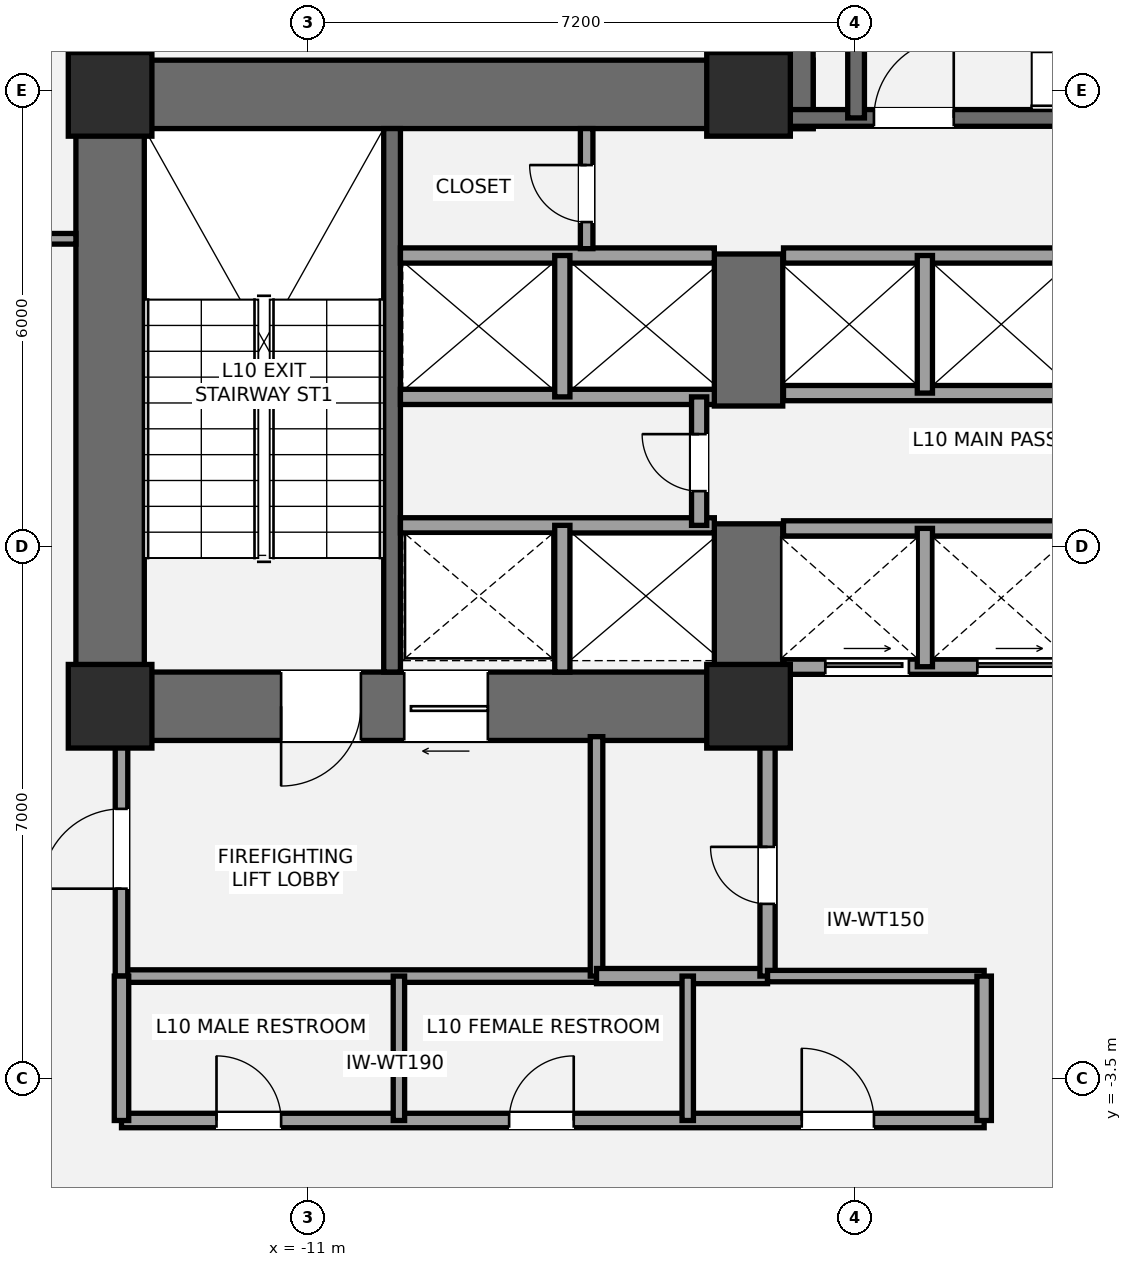
"""IFC4 building model, lengths in metres.
Left out: names, types, materials, properties, quantities, classifications, styles, units other than length and angle.
Written with IfcOpenShell. Run it as: python <this file> out.ifc"""

import sys

from ifc_helpers import new_model, si_unit, direction, frame, frame_2d, origin, origin_2d, place, context, subcontext, project, spatial, rectangle, extrude, element, fill, save


model = new_model("IFC4")
c1 = context("Model", 3, precision=1e-05, world=origin(), true_north=direction((0.0, 1.0)))
c2 = subcontext(c1, "Body", "Model", "MODEL_VIEW")
j1 = project(units=[si_unit("LENGTHUNIT", "METRE"), si_unit("PLANEANGLEUNIT", "RADIAN")], contexts=[c1])
p1 = place(None, origin())
s1 = spatial("IfcSite", under=j1, at=p1, CompositionType="ELEMENT")
p2 = place(p1, origin())
s2 = spatial("IfcBuilding", under=s1, at=p2, CompositionType="ELEMENT")
p3 = place(p2, frame((0.0, 0.0, 41.4)))
s3 = spatial("IfcBuildingStorey", under=s2, at=p3, CompositionType="ELEMENT", Elevation=41.4)
p4 = place(p3, frame((-13.6, 0.95, 0.0), z_axis=(0.0, 0.0, 1.0), x_axis=(0.0, 1.0, 0.0)))
e1 = element("IfcWall", 1, at=p4, inside=s3, PredefinedType="SHEAR", context=c2, shape_type="SweptSolid", body=[
    extrude(rectangle(XDim=8.95, YDim=0.9, at=frame_2d((4.475, 0.0))), origin(), (0.0, 0.0, 1.0), 3.6),
])
p5 = place(p3, frame((-14.05, 9.45, 0.0), z_axis=(0.0, 0.0, 1.0), x_axis=(1.0, 0.0, 0.0)))
e2 = element("IfcWall", 2, at=p5, inside=s3, PredefinedType="SHEAR", context=c2, shape_type="SweptSolid", body=[
    extrude(rectangle(XDim=9.7, YDim=0.9, at=frame_2d((4.85, 0.0))), origin(), (0.0, 0.0, 1.0), 3.6),
])
p6 = place(p3, frame((-4.75, 1.4, 0.0), z_axis=(0.0, 0.0, 1.0), x_axis=(-1.0, 0.0, 0.0)))
e3 = element("IfcWall", 3, at=p6, inside=s3, PredefinedType="SHEAR", context=c2, shape_type="SweptSolid", body=[
    extrude(rectangle(XDim=9.3, YDim=0.9, at=frame_2d((4.65, 0.0))), origin(), (0.0, 0.0, 1.0), 3.6),
])
p7 = place(p6, frame((5.55, 0.0, 0.0)))
e4 = element("IfcOpeningElement", 4, at=p7, cuts=e3, PredefinedType="OPENING", context=c2, shape_type="SweptSolid", body=[
    extrude(rectangle(XDim=1.05, YDim=2.15, at=frame_2d((0.525, 1.075))), frame((0.0, 0.46, 0.0), z_axis=(0.0, -1.0, 0.0), x_axis=(1.0, 0.0, 0.0)), (0.0, 0.0, 1.0), 0.92),
])
p8 = place(p6, frame((3.88, 0.0, 0.0)))
e5 = element("IfcOpeningElement", 5, at=p8, cuts=e3, PredefinedType="OPENING", context=c2, shape_type="SweptSolid", body=[
    extrude(rectangle(XDim=1.1, YDim=2.2, at=frame_2d((0.55, 1.1))), frame((0.0, 0.46, 0.0), z_axis=(0.0, -1.0, 0.0), x_axis=(1.0, 0.0, 0.0)), (0.0, 0.0, 1.0), 0.92),
])
p9 = place(p3, frame((-5.2, 0.95, 0.0), z_axis=(0.0, 0.0, 1.0), x_axis=(0.0, 1.0, 0.0)))
e6 = element("IfcWall", 6, at=p9, inside=s3, PredefinedType="SHEAR", context=c2, shape_type="SweptSolid", body=[
    extrude(rectangle(XDim=2.85, YDim=0.9, at=frame_2d((1.425, 0.0))), origin(), (0.0, 0.0, 1.0), 3.6),
])
p10 = place(p3, frame((-5.2, 5.35, 0.0), z_axis=(0.0, 0.0, 1.0), x_axis=(0.0, 1.0, 0.0)))
e7 = element("IfcWall", 7, at=p10, inside=s3, PredefinedType="SHEAR", context=c2, shape_type="SweptSolid", body=[
    extrude(rectangle(XDim=2.0, YDim=0.9, at=frame_2d((1.0, 0.0))), origin(), (0.0, 0.0, 1.0), 3.6),
])
p11 = place(p3, frame((-9.89, 1.85, 0.0), z_axis=(0.0, 0.0, 1.0), x_axis=(0.0, 1.0, 0.0)))
e8 = element("IfcWall", 8, at=p11, inside=s3, PredefinedType="SHEAR", context=c2, shape_type="SweptSolid", body=[
    extrude(rectangle(XDim=7.15, YDim=0.22, at=frame_2d((3.575, 0.0))), origin(), (0.0, 0.0, 1.0), 3.6),
])
p12 = place(p3, frame((-4.8, 9.0, 0.0), z_axis=(0.0, 0.0, 1.0), x_axis=(0.0, 1.0, 0.0)))
e9 = element("IfcWall", 9, at=p12, inside=s3, PredefinedType="SHEAR", context=c2, shape_type="SweptSolid", body=[
    extrude(rectangle(XDim=4.3, YDim=0.9, at=frame_2d((2.15, 0.0))), origin(), (0.0, 0.0, 1.0), 3.6),
])
p13 = place(p3, frame((-4.7, 9.14, 0.0), z_axis=(0.0, 0.0, 1.0), x_axis=(1.0, 0.0, 0.0)))
e10 = element("IfcWall", 10, at=p13, inside=s3, PredefinedType="SHEAR", context=c2, shape_type="SweptSolid", body=[
    extrude(rectangle(XDim=9.3, YDim=0.22, at=frame_2d((4.65, 0.0))), origin(), (0.0, 0.0, 1.0), 3.6),
])
p14 = place(p13, frame((1.15, 0.0, 0.0)))
e11 = element("IfcOpeningElement", 11, at=p14, cuts=e10, PredefinedType="OPENING", context=c2, shape_type="SweptSolid", body=[
    extrude(rectangle(XDim=1.05, YDim=2.15, at=frame_2d((0.525, 1.075))), frame((0.0, 0.12, 0.0), z_axis=(0.0, -1.0, 0.0), x_axis=(1.0, 0.0, 0.0)), (0.0, 0.0, 1.0), 0.24),
])
p15 = place(p3, frame((-3.785, 9.14, 0.0), z_axis=(0.0, 0.0, 1.0), x_axis=(0.0, 1.0, 0.0)))
e12 = element("IfcWall", 12, at=p15, inside=s3, PredefinedType="SHEAR", context=c2, shape_type="SweptSolid", body=[
    extrude(rectangle(XDim=3.26, YDim=0.22, at=frame_2d((1.63, 0.0))), origin(), (0.0, 0.0, 1.0), 3.6),
])
for number, where, z_axis, x_axis in (
    (13, (-13.6, 1.4, 0.0), (0.0, 0.0, 1.0), (1.0, 0.0, 0.0)),
    (14, (-13.6, 9.45, 0.0), (0.0, 0.0, 1.0), (1.0, 0.0, 0.0)),
    (15, (-5.2, 1.4, 0.0), (0.0, 0.0, 1.0), (1.0, 0.0, 0.0)),
    (16, (-5.2, 9.45, 0.0), (0.0, 0.0, 1.0), (1.0, 0.0, 0.0)),
):
    element("IfcColumn", number, at=place(p3, frame(where, z_axis=z_axis, x_axis=x_axis)), inside=s3, PredefinedType="COLUMN", context=c2, shape_type="SweptSolid", body=[
        extrude(rectangle(XDim=1.1, YDim=1.1, at=origin_2d()), origin(), (0.0, 0.0, 1.0), 3.6),
    ])
p16 = place(p3, frame((-13.45, -2.15, 0.0), z_axis=(0.0, 0.0, 1.0), x_axis=(1.0, 0.0, 0.0)))
e17 = element("IfcWall", 17, at=p16, inside=s3, PredefinedType="PARTITIONING", context=c2, shape_type="SweptSolid", body=[
    extrude(rectangle(XDim=6.25, YDim=0.165, at=frame_2d((3.125, 0.0))), origin(), (0.0, 0.0, 1.0), 2.853),
])
p17 = place(p3, frame((-13.45, -2.15, 0.0), z_axis=(0.0, 0.0, 1.0), x_axis=(0.0, 1.0, 0.0)))
e18 = element("IfcWall", 18, at=p17, inside=s3, PredefinedType="PARTITIONING", context=c2, shape_type="SweptSolid", body=[
    extrude(rectangle(XDim=3.15, YDim=0.165, at=frame_2d((1.575, 0.0))), origin(), (0.0, 0.0, 1.0), 2.853),
])
p18 = place(p17, frame((1.15, 0.0, 0.0)))
e19 = element("IfcOpeningElement", 19, at=p18, cuts=e18, PredefinedType="OPENING", context=c2, shape_type="SweptSolid", body=[
    extrude(rectangle(XDim=1.05, YDim=2.15, at=frame_2d((0.525, 1.075))), frame((0.0, 0.093, 0.0), z_axis=(0.0, -1.0, 0.0), x_axis=(1.0, 0.0, 0.0)), (0.0, 0.0, 1.0), 0.185),
])
p19 = place(p3, frame((-7.2, -2.15, 0.0), z_axis=(0.0, 0.0, 1.0), x_axis=(0.0, 1.0, 0.0)))
e20 = element("IfcWall", 20, at=p19, inside=s3, PredefinedType="PARTITIONING", context=c2, shape_type="SweptSolid", body=[
    extrude(rectangle(XDim=3.15, YDim=0.165, at=frame_2d((1.575, 0.0))), origin(), (0.0, 0.0, 1.0), 2.853),
])
p20 = place(p3, frame((-7.2, -2.15, 0.0), z_axis=(0.0, 0.0, 1.0), x_axis=(1.0, 0.0, 0.0)))
e21 = element("IfcWall", 21, at=p20, inside=s3, PredefinedType="SOLIDWALL", context=c2, shape_type="SweptSolid", body=[
    extrude(rectangle(XDim=2.25, YDim=0.2, at=frame_2d((1.125, 0.0))), origin(), (0.0, 0.0, 1.0), 3.4),
])
p21 = place(p3, frame((-4.95, -2.15, 0.0), z_axis=(0.0, 0.0, 1.0), x_axis=(0.0, 1.0, 0.0)))
e22 = element("IfcWall", 22, at=p21, inside=s3, PredefinedType="SOLIDWALL", context=c2, shape_type="SweptSolid", body=[
    extrude(rectangle(XDim=3.15, YDim=0.2, at=frame_2d((1.575, 0.0))), origin(), (0.0, 0.0, 1.0), 2.853),
])
p22 = place(p21, frame((0.95, 0.0, 0.0)))
e23 = element("IfcOpeningElement", 23, at=p22, cuts=e22, PredefinedType="OPENING", context=c2, shape_type="SweptSolid", body=[
    extrude(rectangle(XDim=0.75, YDim=2.1, at=frame_2d((0.375, 1.05))), frame((0.0, 0.11, 0.0), z_axis=(0.0, -1.0, 0.0), x_axis=(1.0, 0.0, 0.0)), (0.0, 0.0, 1.0), 0.22),
])
p23 = place(p3, frame((-9.78, 3.78, 0.0), z_axis=(0.0, 0.0, 1.0), x_axis=(1.0, 0.0, 0.0)))
e24 = element("IfcWall", 24, at=p23, inside=s3, PredefinedType="SOLIDWALL", context=c2, shape_type="SweptSolid", body=[
    extrude(rectangle(XDim=4.13, YDim=0.2, at=frame_2d((2.065, 0.0))), origin(), (0.0, 0.0, 1.0), 3.4),
])
p24 = place(p3, frame((-7.65, 1.85, 0.0), z_axis=(0.0, 0.0, 1.0), x_axis=(0.0, 1.0, 0.0)))
e25 = element("IfcWall", 25, at=p24, inside=s3, PredefinedType="SOLIDWALL", context=c2, shape_type="SweptSolid", body=[
    extrude(rectangle(XDim=1.93, YDim=0.2, at=frame_2d((0.965, 0.0))), origin(), (0.0, 0.0, 1.0), 3.4),
])
for number, where, z_axis, x_axis in (
    (26, (-9.78, 5.47, 0.0), (0.0, 0.0, 1.0), (1.0, 0.0, 0.0)),
    (27, (-9.78, 7.33, 0.0), (0.0, 0.0, 1.0), (1.0, 0.0, 0.0)),
):
    element("IfcWall", number, at=place(p3, frame(where, z_axis=z_axis, x_axis=x_axis)), inside=s3, PredefinedType="SOLIDWALL", context=c2, shape_type="SweptSolid", body=[
        extrude(rectangle(XDim=4.13, YDim=0.2, at=frame_2d((2.065, 0.0))), origin(), (0.0, 0.0, 1.0), 3.4),
    ])
p25 = place(p3, frame((-7.65, 5.47, 0.0), z_axis=(0.0, 0.0, 1.0), x_axis=(0.0, 1.0, 0.0)))
e28 = element("IfcWall", 28, at=p25, inside=s3, PredefinedType="SOLIDWALL", context=c2, shape_type="SweptSolid", body=[
    extrude(rectangle(XDim=1.86, YDim=0.2, at=frame_2d((0.93, 0.0))), origin(), (0.0, 0.0, 1.0), 3.4),
])
p26 = place(p3, frame((-5.85, 3.78, 0.0), z_axis=(0.0, 0.0, 1.0), x_axis=(0.0, 1.0, 0.0)))
e29 = element("IfcWall", 29, at=p26, inside=s3, PredefinedType="SOLIDWALL", context=c2, shape_type="SweptSolid", body=[
    extrude(rectangle(XDim=1.69, YDim=0.2, at=frame_2d((0.845, 0.0))), origin(), (0.0, 0.0, 1.0), 3.4),
])
p27 = place(p26, frame((0.45, 0.0, 0.0)))
e30 = element("IfcOpeningElement", 30, at=p27, cuts=e29, PredefinedType="OPENING", context=c2, shape_type="SweptSolid", body=[
    extrude(rectangle(XDim=0.75, YDim=2.1, at=frame_2d((0.375, 1.05))), frame((0.0, 0.11, 0.0), z_axis=(0.0, -1.0, 0.0), x_axis=(1.0, 0.0, 0.0)), (0.0, 0.0, 1.0), 0.22),
])
p28 = place(p3, frame((-4.74, 1.92, 0.0), z_axis=(0.0, 0.0, 1.0), x_axis=(1.0, 0.0, 0.0)))
e31 = element("IfcWall", 31, at=p28, inside=s3, PredefinedType="SOLIDWALL", context=c2, shape_type="SweptSolid", body=[
    extrude(rectangle(XDim=3.86, YDim=0.2, at=frame_2d((1.93, 0.0))), origin(), (0.0, 0.0, 1.0), 2.39),
])
p29 = place(p28, frame((0.55, 0.0, 0.0)))
e32 = element("IfcOpeningElement", 32, at=p29, cuts=e31, PredefinedType="OPENING", context=c2, shape_type="SweptSolid", body=[
    extrude(rectangle(XDim=1.1, YDim=2.2, at=frame_2d((0.55, 1.1))), frame((0.0, 0.11, 0.0), z_axis=(0.0, -1.0, 0.0), x_axis=(1.0, 0.0, 0.0)), (0.0, 0.0, 1.0), 0.22),
])
p30 = place(p28, frame((2.55, 0.0, 0.0)))
e33 = element("IfcOpeningElement", 33, at=p30, cuts=e31, PredefinedType="OPENING", context=c2, shape_type="SweptSolid", body=[
    extrude(rectangle(XDim=1.1, YDim=2.2, at=frame_2d((0.55, 1.1))), frame((0.0, 0.11, 0.0), z_axis=(0.0, -1.0, 0.0), x_axis=(1.0, 0.0, 0.0)), (0.0, 0.0, 1.0), 0.22),
])
p31 = place(p3, frame((-4.74, 3.74, 0.0), z_axis=(0.0, 0.0, 1.0), x_axis=(1.0, 0.0, 0.0)))
e34 = element("IfcWall", 34, at=p31, inside=s3, PredefinedType="SOLIDWALL", context=c2, shape_type="SweptSolid", body=[
    extrude(rectangle(XDim=3.86, YDim=0.2, at=frame_2d((1.93, 0.0))), origin(), (0.0, 0.0, 1.0), 3.4),
])
p32 = place(p3, frame((-2.88, 1.92, 0.0), z_axis=(0.0, 0.0, 1.0), x_axis=(0.0, 1.0, 0.0)))
e35 = element("IfcWall", 35, at=p32, inside=s3, PredefinedType="SOLIDWALL", context=c2, shape_type="SweptSolid", body=[
    extrude(rectangle(XDim=1.82, YDim=0.2, at=frame_2d((0.91, 0.0))), origin(), (0.0, 0.0, 1.0), 3.4),
])
for number, where, z_axis, x_axis in (
    (36, (-4.74, 5.52, 0.0), (0.0, 0.0, 1.0), (1.0, 0.0, 0.0)),
    (37, (-4.74, 7.33, 0.0), (0.0, 0.0, 1.0), (1.0, 0.0, 0.0)),
):
    element("IfcWall", number, at=place(p3, frame(where, z_axis=z_axis, x_axis=x_axis)), inside=s3, PredefinedType="SOLIDWALL", context=c2, shape_type="SweptSolid", body=[
        extrude(rectangle(XDim=3.86, YDim=0.2, at=frame_2d((1.93, 0.0))), origin(), (0.0, 0.0, 1.0), 3.4),
    ])
p33 = place(p3, frame((-2.88, 5.52, 0.0), z_axis=(0.0, 0.0, 1.0), x_axis=(0.0, 1.0, 0.0)))
e38 = element("IfcWall", 38, at=p33, inside=s3, PredefinedType="SOLIDWALL", context=c2, shape_type="SweptSolid", body=[
    extrude(rectangle(XDim=1.81, YDim=0.2, at=frame_2d((0.905, 0.0))), origin(), (0.0, 0.0, 1.0), 3.4),
])
p34 = place(p3, frame((-7.33, 7.42, 0.0), z_axis=(0.0, 0.0, 1.0), x_axis=(0.0, 1.0, 0.0)))
e39 = element("IfcWall", 39, at=p34, inside=s3, PredefinedType="PARTITIONING", context=c2, shape_type="SweptSolid", body=[
    extrude(rectangle(XDim=1.58, YDim=0.165, at=frame_2d((0.79, 0.0))), origin(), (0.0, 0.0, 1.0), 3.4),
])
p35 = place(p34, frame((0.35, 0.0, 0.0)))
e40 = element("IfcOpeningElement", 40, at=p35, cuts=e39, PredefinedType="OPENING", context=c2, shape_type="SweptSolid", body=[
    extrude(rectangle(XDim=0.75, YDim=2.1, at=frame_2d((0.375, 1.05))), frame((0.0, 0.093, 0.0), z_axis=(0.0, -1.0, 0.0), x_axis=(1.0, 0.0, 0.0)), (0.0, 0.0, 1.0), 0.185),
])
p36 = place(p3, frame((-13.45, -4.05, 0.0), z_axis=(0.0, 0.0, 1.0), x_axis=(1.0, 0.0, 0.0)))
e41 = element("IfcWall", 41, at=p36, inside=s3, PredefinedType="PLUMBINGWALL", context=c2, shape_type="SweptSolid", body=[
    extrude(rectangle(XDim=11.35, YDim=0.19, at=frame_2d((5.675, 0.0))), origin(), (0.0, 0.0, 1.0), 2.853),
])
p37 = place(p36, frame((1.25, 0.0, 0.0)))
e42 = element("IfcOpeningElement", 42, at=p37, cuts=e41, PredefinedType="OPENING", context=c2, shape_type="SweptSolid", body=[
    extrude(rectangle(XDim=0.85, YDim=2.1, at=frame_2d((0.425, 1.05))), frame((0.0, 0.105, 0.0), z_axis=(0.0, -1.0, 0.0), x_axis=(1.0, 0.0, 0.0)), (0.0, 0.0, 1.0), 0.21),
])
p38 = place(p36, frame((5.1, 0.0, 0.0)))
e43 = element("IfcOpeningElement", 43, at=p38, cuts=e41, PredefinedType="OPENING", context=c2, shape_type="SweptSolid", body=[
    extrude(rectangle(XDim=0.85, YDim=2.1, at=frame_2d((0.425, 1.05))), frame((0.0, 0.105, 0.0), z_axis=(0.0, -1.0, 0.0), x_axis=(1.0, 0.0, 0.0)), (0.0, 0.0, 1.0), 0.21),
])
p39 = place(p36, frame((8.95, 0.0, 0.0)))
e44 = element("IfcOpeningElement", 44, at=p39, cuts=e41, PredefinedType="OPENING", context=c2, shape_type="SweptSolid", body=[
    extrude(rectangle(XDim=0.95, YDim=2.15, at=frame_2d((0.475, 1.075))), frame((0.0, 0.105, 0.0), z_axis=(0.0, -1.0, 0.0), x_axis=(1.0, 0.0, 0.0)), (0.0, 0.0, 1.0), 0.21),
])
p40 = place(p3, frame((-4.95, -2.15, 0.0), z_axis=(0.0, 0.0, 1.0), x_axis=(1.0, 0.0, 0.0)))
e45 = element("IfcWall", 45, at=p40, inside=s3, PredefinedType="PLUMBINGWALL", context=c2, shape_type="SweptSolid", body=[
    extrude(rectangle(XDim=2.85, YDim=0.15, at=frame_2d((1.425, 0.0))), origin(), (0.0, 0.0, 1.0), 2.853),
])
p41 = place(p3, frame((-13.45, -4.05, 0.0), z_axis=(0.0, 0.0, 1.0), x_axis=(0.0, 1.0, 0.0)))
e46 = element("IfcWall", 46, at=p41, inside=s3, PredefinedType="PLUMBINGWALL", context=c2, shape_type="SweptSolid", body=[
    extrude(rectangle(XDim=1.9, YDim=0.19, at=frame_2d((0.95, 0.0))), origin(), (0.0, 0.0, 1.0), 2.853),
])
p42 = place(p3, frame((-2.1, -4.05, 0.0), z_axis=(0.0, 0.0, 1.0), x_axis=(0.0, 1.0, 0.0)))
e47 = element("IfcWall", 47, at=p42, inside=s3, PredefinedType="PLUMBINGWALL", context=c2, shape_type="SweptSolid", body=[
    extrude(rectangle(XDim=1.9, YDim=0.19, at=frame_2d((0.95, 0.0))), origin(), (0.0, 0.0, 1.0), 3.4),
])
p43 = place(p3, frame((-9.8, -4.05, 0.0), z_axis=(0.0, 0.0, 1.0), x_axis=(0.0, 1.0, 0.0)))
e48 = element("IfcWall", 48, at=p43, inside=s3, PredefinedType="PLUMBINGWALL", context=c2, shape_type="SweptSolid", body=[
    extrude(rectangle(XDim=1.9, YDim=0.15, at=frame_2d((0.95, 0.0))), origin(), (0.0, 0.0, 1.0), 2.853),
])
p44 = place(p3, frame((-6.0, -4.05, 0.0), z_axis=(0.0, 0.0, 1.0), x_axis=(0.0, 1.0, 0.0)))
e49 = element("IfcWall", 49, at=p44, inside=s3, PredefinedType="PLUMBINGWALL", context=c2, shape_type="SweptSolid", body=[
    extrude(rectangle(XDim=1.9, YDim=0.15, at=frame_2d((0.95, 0.0))), origin(), (0.0, 0.0, 1.0), 2.841),
])
p45 = place(p3, frame((-24.856, 7.55, 0.0), z_axis=(0.0, 0.0, 1.0), x_axis=(1.0, 0.0, 0.0)))
e50 = element("IfcWall", 50, at=p45, inside=s3, PredefinedType="PARTITIONING", context=c2, shape_type="SweptSolid", body=[
    extrude(rectangle(XDim=10.806, YDim=0.14, at=frame_2d((5.403, 0.0))), origin(), (0.0, 0.0, 1.0), 2.853),
])
p46 = place(p45, frame((1.939, 0.0, 0.0)))
e51 = element("IfcOpeningElement", 51, at=p46, cuts=e50, PredefinedType="OPENING", context=c2, shape_type="SweptSolid", body=[
    extrude(rectangle(XDim=0.92, YDim=2.15, at=frame_2d((0.46, 1.075))), frame((0.0, 0.08, 0.0), z_axis=(0.0, -1.0, 0.0), x_axis=(1.0, 0.0, 0.0)), (0.0, 0.0, 1.0), 0.16),
])
p47 = place(p7, origin())
e52 = element("IfcDoor", 52, at=p47, inside=s3, OperationType="SINGLE_SWING_RIGHT", PredefinedType="DOOR", context=c2, shape_type="SweptSolid", body=[
    extrude(rectangle(XDim=1.05, YDim=2.15, at=frame_2d((0.525, 1.075))), frame((0.0, 0.025, 0.0), z_axis=(0.0, -1.0, 0.0), x_axis=(1.0, 0.0, 0.0)), (0.0, 0.0, 1.0), 0.05),
])
fill(e4, e52)
p48 = place(p14, origin())
e53 = element("IfcDoor", 53, at=p48, inside=s3, OperationType="SINGLE_SWING_RIGHT", PredefinedType="DOOR", context=c2, shape_type="SweptSolid", body=[
    extrude(rectangle(XDim=1.05, YDim=2.15, at=frame_2d((0.525, 1.075))), frame((0.0, 0.025, 0.0), z_axis=(0.0, -1.0, 0.0), x_axis=(1.0, 0.0, 0.0)), (0.0, 0.0, 1.0), 0.05),
])
fill(e11, e53)
p49 = place(p18, origin())
e54 = element("IfcDoor", 54, at=p49, inside=s3, OperationType="SINGLE_SWING_LEFT", PredefinedType="DOOR", context=c2, shape_type="SweptSolid", body=[
    extrude(rectangle(XDim=1.05, YDim=2.15, at=frame_2d((0.525, 1.075))), frame((0.0, 0.025, 0.0), z_axis=(0.0, -1.0, 0.0), x_axis=(1.0, 0.0, 0.0)), (0.0, 0.0, 1.0), 0.05),
])
fill(e19, e54)
p50 = place(p22, origin())
e55 = element("IfcDoor", 55, at=p50, inside=s3, OperationType="SINGLE_SWING_RIGHT", PredefinedType="DOOR", context=c2, shape_type="SweptSolid", body=[
    extrude(rectangle(XDim=0.75, YDim=2.1, at=frame_2d((0.375, 1.05))), frame((0.0, 0.025, 0.0), z_axis=(0.0, -1.0, 0.0), x_axis=(1.0, 0.0, 0.0)), (0.0, 0.0, 1.0), 0.05),
])
fill(e23, e55)
p51 = place(p8, origin())
e56 = element("IfcDoor", 56, at=p51, inside=s3, OperationType="SLIDING_TO_LEFT", PredefinedType="DOOR", context=c2, shape_type="SweptSolid", body=[
    extrude(rectangle(XDim=1.1, YDim=2.2, at=frame_2d((0.55, 1.1))), frame((0.0, 0.025, 0.0), z_axis=(0.0, -1.0, 0.0), x_axis=(1.0, 0.0, 0.0)), (0.0, 0.0, 1.0), 0.05),
])
fill(e5, e56)
p52 = place(p27, origin())
e57 = element("IfcDoor", 57, at=p52, inside=s3, OperationType="SINGLE_SWING_RIGHT", PredefinedType="DOOR", context=c2, shape_type="SweptSolid", body=[
    extrude(rectangle(XDim=0.75, YDim=2.1, at=frame_2d((0.375, 1.05))), frame((0.0, 0.025, 0.0), z_axis=(0.0, -1.0, 0.0), x_axis=(1.0, 0.0, 0.0)), (0.0, 0.0, 1.0), 0.05),
])
fill(e30, e57)
p53 = place(p29, origin())
e58 = element("IfcDoor", 58, at=p53, inside=s3, OperationType="SLIDING_TO_LEFT", PredefinedType="DOOR", context=c2, shape_type="SweptSolid", body=[
    extrude(rectangle(XDim=1.1, YDim=2.2, at=frame_2d((0.55, 1.1))), frame((0.0, 0.025, 0.0), z_axis=(0.0, -1.0, 0.0), x_axis=(1.0, 0.0, 0.0)), (0.0, 0.0, 1.0), 0.05),
])
fill(e32, e58)
p54 = place(p30, origin())
e59 = element("IfcDoor", 59, at=p54, inside=s3, OperationType="SLIDING_TO_LEFT", PredefinedType="DOOR", context=c2, shape_type="SweptSolid", body=[
    extrude(rectangle(XDim=1.1, YDim=2.2, at=frame_2d((0.55, 1.1))), frame((0.0, 0.025, 0.0), z_axis=(0.0, -1.0, 0.0), x_axis=(1.0, 0.0, 0.0)), (0.0, 0.0, 1.0), 0.05),
])
fill(e33, e59)
p55 = place(p35, origin())
e60 = element("IfcDoor", 60, at=p55, inside=s3, OperationType="SINGLE_SWING_RIGHT", PredefinedType="DOOR", context=c2, shape_type="SweptSolid", body=[
    extrude(rectangle(XDim=0.75, YDim=2.1, at=frame_2d((0.375, 1.05))), frame((0.0, 0.025, 0.0), z_axis=(0.0, -1.0, 0.0), x_axis=(1.0, 0.0, 0.0)), (0.0, 0.0, 1.0), 0.05),
])
fill(e40, e60)
p56 = place(p37, origin())
e61 = element("IfcDoor", 61, at=p56, inside=s3, OperationType="SINGLE_SWING_LEFT", PredefinedType="DOOR", context=c2, shape_type="SweptSolid", body=[
    extrude(rectangle(XDim=0.85, YDim=2.1, at=frame_2d((0.425, 1.05))), frame((0.0, 0.025, 0.0), z_axis=(0.0, -1.0, 0.0), x_axis=(1.0, 0.0, 0.0)), (0.0, 0.0, 1.0), 0.05),
])
fill(e42, e61)
p57 = place(p38, origin())
e62 = element("IfcDoor", 62, at=p57, inside=s3, OperationType="SINGLE_SWING_RIGHT", PredefinedType="DOOR", context=c2, shape_type="SweptSolid", body=[
    extrude(rectangle(XDim=0.85, YDim=2.1, at=frame_2d((0.425, 1.05))), frame((0.0, 0.025, 0.0), z_axis=(0.0, -1.0, 0.0), x_axis=(1.0, 0.0, 0.0)), (0.0, 0.0, 1.0), 0.05),
])
fill(e43, e62)
p58 = place(p39, origin())
e63 = element("IfcDoor", 63, at=p58, inside=s3, OperationType="SINGLE_SWING_LEFT", PredefinedType="DOOR", context=c2, shape_type="SweptSolid", body=[
    extrude(rectangle(XDim=0.95, YDim=2.15, at=frame_2d((0.475, 1.075))), frame((0.0, 0.025, 0.0), z_axis=(0.0, -1.0, 0.0), x_axis=(1.0, 0.0, 0.0)), (0.0, 0.0, 1.0), 0.05),
])
fill(e44, e63)
save(model, sys.argv[1])
